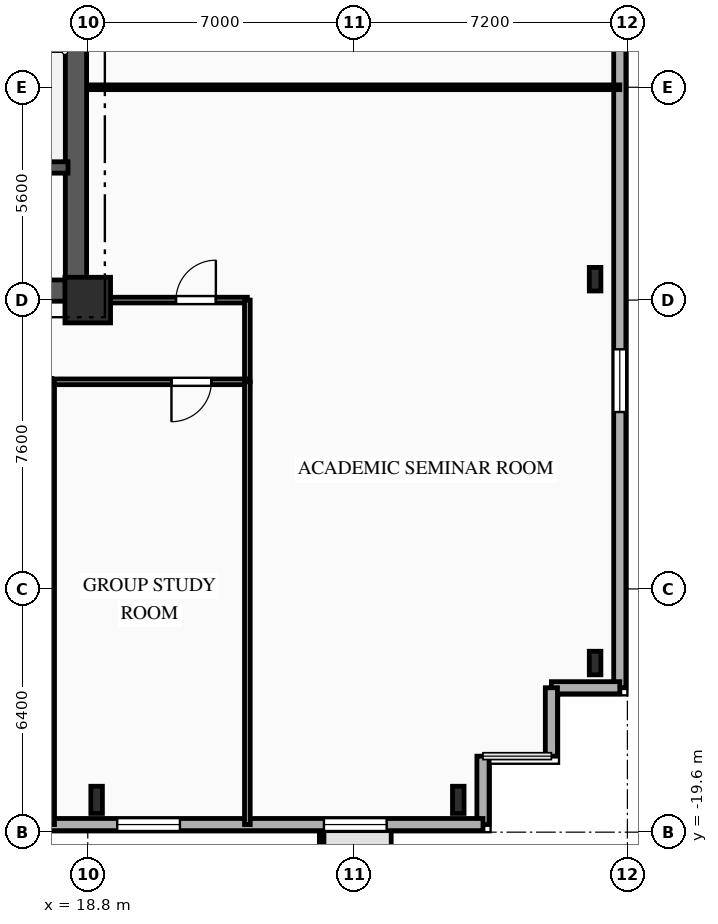
"""IFC4 building model, lengths in metres.
Left out: names, types, materials, properties, quantities, classifications, styles, units other than length and angle.
Written with IfcOpenShell. Run it as: python <this file> out.ifc"""

import sys

from ifc_helpers import new_model, si_unit, direction, frame, frame_2d, origin, origin_2d, place, context, subcontext, project, spatial, rectangle, i_section, extrude, element, fill, save


model = new_model("IFC4")
c1 = context("Model", 3, precision=1e-05, world=origin(), true_north=direction((0.0, 1.0)))
c2 = subcontext(c1, "Body", "Model", "MODEL_VIEW")
j1 = project(units=[si_unit("LENGTHUNIT", "METRE"), si_unit("PLANEANGLEUNIT", "RADIAN")], contexts=[c1])
p1 = place(None, origin())
s1 = spatial("IfcSite", under=j1, at=p1, CompositionType="ELEMENT")
p2 = place(p1, origin())
s2 = spatial("IfcBuilding", under=s1, at=p2, CompositionType="ELEMENT")
p3 = place(p2, frame((0.0, 0.0, 67.2)))
s3 = spatial("IfcBuildingStorey", under=s2, at=p3, CompositionType="ELEMENT", Elevation=67.2)
p4 = place(p3, frame((18.8, -5.6, 0.0), z_axis=(0.0, 0.0, 1.0), x_axis=(1.0, 0.0, 0.0)))
e1 = element("IfcColumn", 1, at=p4, inside=s3, PredefinedType="COLUMN", context=c2, shape_type="SweptSolid", body=[
    extrude(rectangle(XDim=1.2, YDim=1.2, at=origin_2d()), origin(), (0.0, 0.0, 1.0), 3.35),
])
for number, where, z_axis, x_axis in (
    (2, (19.033, -18.75, 0.0), (0.0, 0.0, 1.0), (1.0, 0.0, 0.0)),
    (3, (28.55, -18.75, 0.0), (0.0, 0.0, 1.0), (1.0, 0.0, 0.0)),
):
    element("IfcColumn", number, at=place(p3, frame(where, z_axis=z_axis, x_axis=x_axis)), inside=s3, PredefinedType="COLUMN", context=c2, shape_type="SweptSolid", body=[
        extrude(i_section(OverallWidth=0.304, OverallDepth=0.716, WebThickness=0.021, FlangeThickness=0.04, FilletRadius=0.027, at=origin_2d()), origin(), (0.0, 0.0, 1.0), 3.35),
    ])
for number, where, z_axis, x_axis in (
    (4, (32.15, -15.15, 0.0), (0.0, 0.0, 1.0), (1.0, 0.0, 0.0)),
    (5, (32.15, -5.05, 0.0), (0.0, 0.0, 1.0), (1.0, 0.0, 0.0)),
):
    element("IfcColumn", number, at=place(p3, frame(where, z_axis=z_axis, x_axis=x_axis)), inside=s3, PredefinedType="COLUMN", context=c2, shape_type="SweptSolid", body=[
        extrude(i_section(OverallWidth=0.305, OverallDepth=0.62, WebThickness=0.021, FlangeThickness=0.04, FilletRadius=0.027, at=origin_2d()), origin(), (0.0, 0.0, 1.0), 3.35),
    ])
p5 = place(p3, frame((32.8, 15.8, 0.0), z_axis=(0.0, 0.0, 1.0), x_axis=(0.0, -1.0, 0.0)))
e6 = element("IfcWall", 6, at=p5, inside=s3, PredefinedType="SOLIDWALL", context=c2, shape_type="SweptSolid", body=[
    extrude(rectangle(XDim=31.6, YDim=0.32, at=frame_2d((15.8, 0.0))), origin(), (0.0, 0.0, 1.0), 3.035),
])
p6 = place(p5, frame((7.41, 0.0, 0.85)))
e7 = element("IfcOpeningElement", 7, at=p6, cuts=e6, PredefinedType="OPENING", context=c2, shape_type="SweptSolid", body=[
    extrude(rectangle(XDim=1.5, YDim=1.85, at=frame_2d((0.75, 0.925))), frame((0.0, 0.17, 0.0), z_axis=(0.0, -1.0, 0.0), x_axis=(1.0, 0.0, 0.0)), (0.0, 0.0, 1.0), 0.34),
])
p7 = place(p5, frame((22.695, 0.0, 0.85)))
e8 = element("IfcOpeningElement", 8, at=p7, cuts=e6, PredefinedType="OPENING", context=c2, shape_type="SweptSolid", body=[
    extrude(rectangle(XDim=1.65, YDim=1.85, at=frame_2d((0.825, 0.925))), frame((0.0, 0.17, 0.0), z_axis=(0.0, -1.0, 0.0), x_axis=(1.0, 0.0, 0.0)), (0.0, 0.0, 1.0), 0.34),
])
for number, where, z_axis, x_axis in (
    (9, (32.8, -15.8, 0.0), (0.0, 0.0, 1.0), (-1.0, 0.0, 0.0)),
    (10, (31.0, -15.8, 0.0), (0.0, 0.0, 1.0), (0.0, -1.0, 0.0)),
):
    element("IfcWall", number, at=place(p3, frame(where, z_axis=z_axis, x_axis=x_axis)), inside=s3, PredefinedType="SOLIDWALL", context=c2, shape_type="SweptSolid", body=[
        extrude(rectangle(XDim=1.8, YDim=0.32, at=frame_2d((0.9, 0.0))), origin(), (0.0, 0.0, 1.0), 3.035),
    ])
p8 = place(p3, frame((29.2, -17.6, 0.0), z_axis=(0.0, 0.0, 1.0), x_axis=(0.0, -1.0, 0.0)))
e11 = element("IfcWall", 11, at=p8, inside=s3, PredefinedType="SOLIDWALL", context=c2, shape_type="SweptSolid", body=[
    extrude(rectangle(XDim=1.8, YDim=0.32, at=frame_2d((0.9, 0.0))), origin(), (0.0, 0.0, 1.0), 3.035),
])
p9 = place(p3, frame((29.2, -19.4, 0.0), z_axis=(0.0, 0.0, 1.0), x_axis=(-1.0, 0.0, 0.0)))
e12 = element("IfcWall", 12, at=p9, inside=s3, PredefinedType="SOLIDWALL", context=c2, shape_type="SweptSolid", body=[
    extrude(rectangle(XDim=58.4, YDim=0.32, at=frame_2d((29.2, 0.0))), origin(), (0.0, 0.0, 1.0), 3.035),
])
p10 = place(p9, frame((2.535, 0.0, 0.85)))
e13 = element("IfcOpeningElement", 13, at=p10, cuts=e12, PredefinedType="OPENING", context=c2, shape_type="SweptSolid", body=[
    extrude(rectangle(XDim=1.65, YDim=1.85, at=frame_2d((0.825, 0.925))), frame((0.0, 0.17, 0.0), z_axis=(0.0, -1.0, 0.0), x_axis=(1.0, 0.0, 0.0)), (0.0, 0.0, 1.0), 0.34),
])
p11 = place(p9, frame((7.975, 0.0, 0.85)))
e14 = element("IfcOpeningElement", 14, at=p11, cuts=e12, PredefinedType="OPENING", context=c2, shape_type="SweptSolid", body=[
    extrude(rectangle(XDim=1.65, YDim=1.85, at=frame_2d((0.825, 0.925))), frame((0.0, 0.17, 0.0), z_axis=(0.0, -1.0, 0.0), x_axis=(1.0, 0.0, 0.0)), (0.0, 0.0, 1.0), 0.34),
])
p12 = place(p9, frame((13.14, 0.0, 0.85)))
e15 = element("IfcOpeningElement", 15, at=p12, cuts=e12, PredefinedType="OPENING", context=c2, shape_type="SweptSolid", body=[
    extrude(rectangle(XDim=2.2, YDim=1.85, at=frame_2d((1.1, 0.925))), frame((0.0, 0.17, 0.0), z_axis=(0.0, -1.0, 0.0), x_axis=(1.0, 0.0, 0.0)), (0.0, 0.0, 1.0), 0.34),
])
p13 = place(p9, frame((19.992, 0.0, 0.85)))
e16 = element("IfcOpeningElement", 16, at=p13, cuts=e12, PredefinedType="OPENING", context=c2, shape_type="SweptSolid", body=[
    extrude(rectangle(XDim=2.2, YDim=1.85, at=frame_2d((1.1, 0.925))), frame((0.0, 0.17, 0.0), z_axis=(0.0, -1.0, 0.0), x_axis=(1.0, 0.0, 0.0)), (0.0, 0.0, 1.0), 0.34),
])
p14 = place(p9, frame((24.66, 0.0, 0.85)))
e17 = element("IfcOpeningElement", 17, at=p14, cuts=e12, PredefinedType="OPENING", context=c2, shape_type="SweptSolid", body=[
    extrude(rectangle(XDim=2.2, YDim=1.85, at=frame_2d((1.1, 0.925))), frame((0.0, 0.17, 0.0), z_axis=(0.0, -1.0, 0.0), x_axis=(1.0, 0.0, 0.0)), (0.0, 0.0, 1.0), 0.34),
])
p15 = place(p9, frame((30.42, 0.0, 0.85)))
e18 = element("IfcOpeningElement", 18, at=p15, cuts=e12, PredefinedType="OPENING", context=c2, shape_type="SweptSolid", body=[
    extrude(rectangle(XDim=2.2, YDim=1.85, at=frame_2d((1.1, 0.925))), frame((0.0, 0.17, 0.0), z_axis=(0.0, -1.0, 0.0), x_axis=(1.0, 0.0, 0.0)), (0.0, 0.0, 1.0), 0.34),
])
p16 = place(p9, frame((36.18, 0.0, 0.85)))
e19 = element("IfcOpeningElement", 19, at=p16, cuts=e12, PredefinedType="OPENING", context=c2, shape_type="SweptSolid", body=[
    extrude(rectangle(XDim=2.2, YDim=1.85, at=frame_2d((1.1, 0.925))), frame((0.0, 0.17, 0.0), z_axis=(0.0, -1.0, 0.0), x_axis=(1.0, 0.0, 0.0)), (0.0, 0.0, 1.0), 0.34),
])
p17 = place(p9, frame((41.94, 0.0, 0.85)))
e20 = element("IfcOpeningElement", 20, at=p17, cuts=e12, PredefinedType="OPENING", context=c2, shape_type="SweptSolid", body=[
    extrude(rectangle(XDim=2.2, YDim=1.85, at=frame_2d((1.1, 0.925))), frame((0.0, 0.17, 0.0), z_axis=(0.0, -1.0, 0.0), x_axis=(1.0, 0.0, 0.0)), (0.0, 0.0, 1.0), 0.34),
])
p18 = place(p9, frame((48.821, 0.0, 0.85)))
e21 = element("IfcOpeningElement", 21, at=p18, cuts=e12, PredefinedType="OPENING", context=c2, shape_type="SweptSolid", body=[
    extrude(rectangle(XDim=1.65, YDim=1.85, at=frame_2d((0.825, 0.925))), frame((0.0, 0.17, 0.0), z_axis=(0.0, -1.0, 0.0), x_axis=(1.0, 0.0, 0.0)), (0.0, 0.0, 1.0), 0.34),
])
p19 = place(p9, frame((53.775, 0.0, 0.85)))
e22 = element("IfcOpeningElement", 22, at=p19, cuts=e12, PredefinedType="OPENING", context=c2, shape_type="SweptSolid", body=[
    extrude(rectangle(XDim=1.65, YDim=1.85, at=frame_2d((0.825, 0.925))), frame((0.0, 0.17, 0.0), z_axis=(0.0, -1.0, 0.0), x_axis=(1.0, 0.0, 0.0)), (0.0, 0.0, 1.0), 0.34),
])
p20 = place(p3, frame((9.2, -5.35, 0.0), z_axis=(0.0, 0.0, 1.0), x_axis=(1.0, 0.0, 0.0)))
e23 = element("IfcWall", 23, at=p20, inside=s3, PredefinedType="SHEAR", context=c2, shape_type="SweptSolid", body=[
    extrude(rectangle(XDim=9.6, YDim=0.56, at=frame_2d((4.8, 0.0))), origin(), (0.0, 0.0, 1.0), 3.035),
])
p21 = place(p20, frame((7.65, 0.0, 0.0)))
e24 = element("IfcOpeningElement", 24, at=p21, cuts=e23, PredefinedType="OPENING", context=c2, shape_type="SweptSolid", body=[
    extrude(rectangle(XDim=0.9, YDim=2.1, at=frame_2d((0.45, 1.05))), frame((0.0, 0.29, 0.0), z_axis=(0.0, -1.0, 0.0), x_axis=(1.0, 0.0, 0.0)), (0.0, 0.0, 1.0), 0.58),
])
p22 = place(p3, frame((18.49, -5.05, 0.0), z_axis=(0.0, 0.0, 1.0), x_axis=(0.0, 1.0, 0.0)))
e25 = element("IfcWall", 25, at=p22, inside=s3, PredefinedType="SHEAR", context=c2, shape_type="SweptSolid", body=[
    extrude(rectangle(XDim=10.1, YDim=0.56, at=frame_2d((5.05, 0.0))), origin(), (0.0, 0.0, 1.0), 3.035),
])
p23 = place(p3, frame((15.1, -2.11, 0.0), z_axis=(0.0, 0.0, 1.0), x_axis=(1.0, 0.0, 0.0)))
e26 = element("IfcWall", 26, at=p23, inside=s3, PredefinedType="SHEAR", context=c2, shape_type="SweptSolid", body=[
    extrude(rectangle(XDim=3.18, YDim=0.3, at=frame_2d((1.59, 0.0))), origin(), (0.0, 0.0, 1.0), 3.035),
])
p24 = place(p3, frame((18.8, -5.6, 0.0), z_axis=(0.0, 0.0, 1.0), x_axis=(1.0, 0.0, 0.0)))
e27 = element("IfcWall", 27, at=p24, inside=s3, PredefinedType="PARTITIONING", context=c2, shape_type="SweptSolid", body=[
    extrude(rectangle(XDim=4.2, YDim=0.15, at=frame_2d((2.1, 0.0))), origin(), (0.0, 0.0, 1.0), 3.035),
])
p25 = place(p24, frame((2.321, 0.0, 0.0)))
e28 = element("IfcOpeningElement", 28, at=p25, cuts=e27, PredefinedType="OPENING", context=c2, shape_type="SweptSolid", body=[
    extrude(rectangle(XDim=1.05, YDim=2.15, at=frame_2d((0.525, 1.075))), frame((0.0, 0.085, 0.0), z_axis=(0.0, -1.0, 0.0), x_axis=(1.0, 0.0, 0.0)), (0.0, 0.0, 1.0), 0.17),
])
p26 = place(p3, frame((23.0, -5.6, 0.0), z_axis=(0.0, 0.0, 1.0), x_axis=(0.0, -1.0, 0.0)))
e29 = element("IfcWall", 29, at=p26, inside=s3, PredefinedType="PARTITIONING", context=c2, shape_type="SweptSolid", body=[
    extrude(rectangle(XDim=2.15, YDim=0.15, at=frame_2d((1.075, 0.0))), origin(), (0.0, 0.0, 1.0), 3.035),
])
p27 = place(p3, frame((23.0, -7.75, 0.0), z_axis=(0.0, 0.0, 1.0), x_axis=(-1.0, 0.0, 0.0)))
e30 = element("IfcWall", 30, at=p27, inside=s3, PredefinedType="PARTITIONING", context=c2, shape_type="SweptSolid", body=[
    extrude(rectangle(XDim=5.15, YDim=0.15, at=frame_2d((2.575, 0.0))), origin(), (0.0, 0.0, 1.0), 3.035),
])
p28 = place(p27, frame((0.948, 0.0, 0.0)))
e31 = element("IfcOpeningElement", 31, at=p28, cuts=e30, PredefinedType="OPENING", context=c2, shape_type="SweptSolid", body=[
    extrude(rectangle(XDim=1.05, YDim=2.15, at=frame_2d((0.525, 1.075))), frame((0.0, 0.085, 0.0), z_axis=(0.0, -1.0, 0.0), x_axis=(1.0, 0.0, 0.0)), (0.0, 0.0, 1.0), 0.17),
])
p29 = place(p3, frame((18.8, 0.0, 0.0), z_axis=(0.0, 0.0, 1.0), x_axis=(1.0, 0.0, 0.0)))
e32 = element("IfcWall", 32, at=p29, inside=s3, PredefinedType="PARTITIONING", context=c2, shape_type="SweptSolid", body=[
    extrude(rectangle(XDim=14.0, YDim=0.125, at=frame_2d((7.0, 0.0))), origin(), (0.0, 0.0, 1.0), 3.035),
])
for number, where, z_axis, x_axis in (
    (33, (23.0, -19.4, 0.0), (0.0, 0.0, 1.0), (0.0, 1.0, 0.0)),
    (34, (17.85, -7.75, 0.0), (0.0, 0.0, 1.0), (0.0, -1.0, 0.0)),
):
    element("IfcWall", number, at=place(p3, frame(where, z_axis=z_axis, x_axis=x_axis)), inside=s3, PredefinedType="PARTITIONING", context=c2, shape_type="SweptSolid", body=[
        extrude(rectangle(XDim=11.65, YDim=0.15, at=frame_2d((5.825, 0.0))), origin(), (0.0, 0.0, 1.0), 3.035),
    ])
p30 = place(p7, origin())
e35 = element("IfcWindow", 35, at=p30, inside=s3, PartitioningType="SINGLE_PANEL", PredefinedType="WINDOW", context=c2, shape_type="SweptSolid", body=[
    extrude(rectangle(XDim=1.65, YDim=1.85, at=frame_2d((0.825, 0.925))), frame((0.0, 0.03, 0.0), z_axis=(0.0, -1.0, 0.0), x_axis=(1.0, 0.0, 0.0)), (0.0, 0.0, 1.0), 0.06),
])
fill(e8, e35)
p31 = place(p10, origin())
e36 = element("IfcWindow", 36, at=p31, inside=s3, PartitioningType="SINGLE_PANEL", PredefinedType="WINDOW", context=c2, shape_type="SweptSolid", body=[
    extrude(rectangle(XDim=1.65, YDim=1.85, at=frame_2d((0.825, 0.925))), frame((0.0, 0.03, 0.0), z_axis=(0.0, -1.0, 0.0), x_axis=(1.0, 0.0, 0.0)), (0.0, 0.0, 1.0), 0.06),
])
fill(e13, e36)
p32 = place(p11, origin())
e37 = element("IfcWindow", 37, at=p32, inside=s3, PartitioningType="SINGLE_PANEL", PredefinedType="WINDOW", context=c2, shape_type="SweptSolid", body=[
    extrude(rectangle(XDim=1.65, YDim=1.85, at=frame_2d((0.825, 0.925))), frame((0.0, 0.03, 0.0), z_axis=(0.0, -1.0, 0.0), x_axis=(1.0, 0.0, 0.0)), (0.0, 0.0, 1.0), 0.06),
])
fill(e14, e37)
p33 = place(p25, origin())
e38 = element("IfcDoor", 38, at=p33, inside=s3, OperationType="SINGLE_SWING_RIGHT", PredefinedType="DOOR", context=c2, shape_type="SweptSolid", body=[
    extrude(rectangle(XDim=1.05, YDim=2.15, at=frame_2d((0.525, 1.075))), frame((0.0, 0.025, 0.0), z_axis=(0.0, -1.0, 0.0), x_axis=(1.0, 0.0, 0.0)), (0.0, 0.0, 1.0), 0.05),
])
fill(e28, e38)
p34 = place(p28, origin())
e39 = element("IfcDoor", 39, at=p34, inside=s3, OperationType="SINGLE_SWING_RIGHT", PredefinedType="DOOR", context=c2, shape_type="SweptSolid", body=[
    extrude(rectangle(XDim=1.05, YDim=2.15, at=frame_2d((0.525, 1.075))), frame((0.0, 0.025, 0.0), z_axis=(0.0, -1.0, 0.0), x_axis=(1.0, 0.0, 0.0)), (0.0, 0.0, 1.0), 0.05),
])
fill(e31, e39)
save(model, sys.argv[1])
